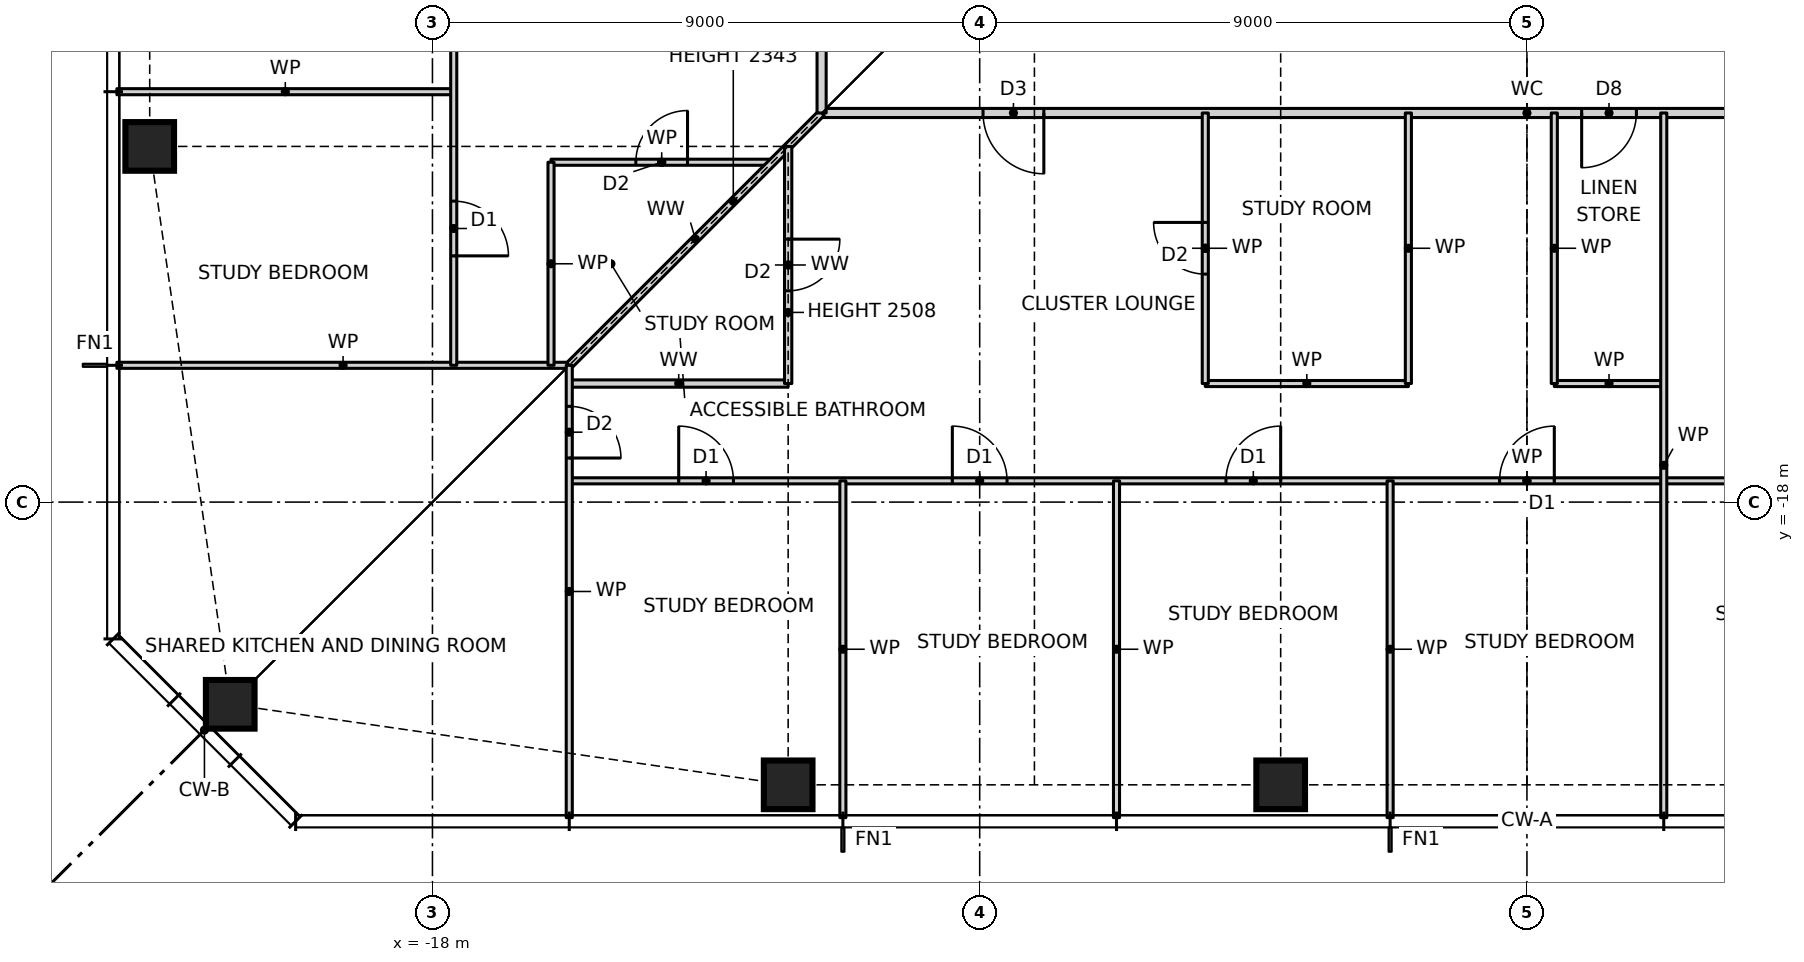
"""IFC4 building model, lengths in metres.
Left out: names, types, materials, properties, quantities, classifications, styles, units other than length and angle.
Written with IfcOpenShell. Run it as: python <this file> out.ifc"""

import sys

from ifc_helpers import new_model, si_unit, direction, frame, frame_2d, origin, origin_2d, place, context, subcontext, project, spatial, rectangle, hollow_rectangle, extrude, element, fill, save


model = new_model("IFC4")
c1 = context("Model", 3, precision=1e-05, world=origin(), true_north=direction((0.0, 1.0)))
c2 = subcontext(c1, "Body", "Model", "MODEL_VIEW")
j1 = project(units=[si_unit("LENGTHUNIT", "METRE"), si_unit("PLANEANGLEUNIT", "RADIAN")], contexts=[c1])
p1 = place(None, origin())
s1 = spatial("IfcSite", under=j1, at=p1, CompositionType="ELEMENT")
p2 = place(p1, origin())
s2 = spatial("IfcBuilding", under=s1, at=p2, CompositionType="ELEMENT")
p3 = place(p2, frame((0.0, 0.0, 60.5)))
s3 = spatial("IfcBuildingStorey", under=s2, at=p3, CompositionType="ELEMENT", Elevation=60.5)
for number, where, z_axis, x_axis in (
    (1, (-21.326, -21.326, 0.0), (0.0, 0.0, 1.0), (1.0, 0.0, 0.0)),
    (2, (-12.15, -22.65, 0.0), (0.0, 0.0, 1.0), (1.0, 0.0, 0.0)),
    (3, (-4.05, -22.65, 0.0), (0.0, 0.0, 1.0), (1.0, 0.0, 0.0)),
    (4, (-22.65, -12.15, 0.0), (0.0, 0.0, 1.0), (1.0, 0.0, 0.0)),
):
    element("IfcColumn", number, at=place(p3, frame(where, z_axis=z_axis, x_axis=x_axis)), inside=s3, PredefinedType="COLUMN", context=c2, shape_type="SweptSolid", body=[
        extrude(hollow_rectangle(XDim=0.8, YDim=0.8, WallThickness=0.09, at=origin_2d()), origin(), (0.0, 0.0, 1.0), 3.5),
    ])
p4 = place(p3, frame((-15.75, -17.65, 0.0), z_axis=(0.0, 0.0, 1.0), x_axis=(1.0, 0.0, 0.0)))
e5 = element("IfcWall", 5, at=p4, inside=s3, PredefinedType="PARTITIONING", context=c2, shape_type="SweptSolid", body=[
    extrude(rectangle(XDim=31.5, YDim=0.1, at=frame_2d((15.75, 0.0))), origin(), (0.0, 0.0, 1.0), 3.27),
])
p5 = place(p4, frame((1.8, 0.0, 0.0)))
e6 = element("IfcOpeningElement", 6, at=p5, cuts=e5, PredefinedType="OPENING", context=c2, shape_type="SweptSolid", body=[
    extrude(rectangle(XDim=0.9, YDim=2.1, at=frame_2d((0.45, 1.05))), frame((0.0, 0.06, 0.0), z_axis=(0.0, -1.0, 0.0), x_axis=(1.0, 0.0, 0.0)), (0.0, 0.0, 1.0), 0.12),
])
p6 = place(p4, frame((6.3, 0.0, 0.0)))
e7 = element("IfcOpeningElement", 7, at=p6, cuts=e5, PredefinedType="OPENING", context=c2, shape_type="SweptSolid", body=[
    extrude(rectangle(XDim=0.9, YDim=2.1, at=frame_2d((0.45, 1.05))), frame((0.0, 0.06, 0.0), z_axis=(0.0, -1.0, 0.0), x_axis=(1.0, 0.0, 0.0)), (0.0, 0.0, 1.0), 0.12),
])
p7 = place(p4, frame((10.8, 0.0, 0.0)))
e8 = element("IfcOpeningElement", 8, at=p7, cuts=e5, PredefinedType="OPENING", context=c2, shape_type="SweptSolid", body=[
    extrude(rectangle(XDim=0.9, YDim=2.1, at=frame_2d((0.45, 1.05))), frame((0.0, 0.06, 0.0), z_axis=(0.0, -1.0, 0.0), x_axis=(1.0, 0.0, 0.0)), (0.0, 0.0, 1.0), 0.12),
])
p8 = place(p4, frame((15.3, 0.0, 0.0)))
e9 = element("IfcOpeningElement", 9, at=p8, cuts=e5, PredefinedType="OPENING", context=c2, shape_type="SweptSolid", body=[
    extrude(rectangle(XDim=0.9, YDim=2.1, at=frame_2d((0.45, 1.05))), frame((0.0, 0.06, 0.0), z_axis=(0.0, -1.0, 0.0), x_axis=(1.0, 0.0, 0.0)), (0.0, 0.0, 1.0), 0.12),
])
p9 = place(p4, frame((19.8, 0.0, 0.0)))
e10 = element("IfcOpeningElement", 10, at=p9, cuts=e5, PredefinedType="OPENING", context=c2, shape_type="SweptSolid", body=[
    extrude(rectangle(XDim=0.9, YDim=2.1, at=frame_2d((0.45, 1.05))), frame((0.0, 0.06, 0.0), z_axis=(0.0, -1.0, 0.0), x_axis=(1.0, 0.0, 0.0)), (0.0, 0.0, 1.0), 0.12),
])
p10 = place(p4, frame((24.3, 0.0, 0.0)))
e11 = element("IfcOpeningElement", 11, at=p10, cuts=e5, PredefinedType="OPENING", context=c2, shape_type="SweptSolid", body=[
    extrude(rectangle(XDim=0.9, YDim=2.1, at=frame_2d((0.45, 1.05))), frame((0.0, 0.06, 0.0), z_axis=(0.0, -1.0, 0.0), x_axis=(1.0, 0.0, 0.0)), (0.0, 0.0, 1.0), 0.12),
])
p11 = place(p4, frame((28.8, 0.0, 0.0)))
e12 = element("IfcOpeningElement", 12, at=p11, cuts=e5, PredefinedType="OPENING", context=c2, shape_type="SweptSolid", body=[
    extrude(rectangle(XDim=0.9, YDim=2.1, at=frame_2d((0.45, 1.05))), frame((0.0, 0.06, 0.0), z_axis=(0.0, -1.0, 0.0), x_axis=(1.0, 0.0, 0.0)), (0.0, 0.0, 1.0), 0.12),
])
p12 = place(p3, frame((-15.75, -16.05, 0.0), z_axis=(0.0, 0.0, 1.0), x_axis=(1.0, 0.0, 0.0)))
e13 = element("IfcWall", 13, at=p12, inside=s3, PredefinedType="PARTITIONING", context=c2, shape_type="SweptSolid", body=[
    extrude(rectangle(XDim=3.6, YDim=0.12, at=frame_2d((1.8, 0.0))), origin(), (0.0, 0.0, 1.0), 3.27),
])
p13 = place(p3, frame((-5.29, -16.05, 0.0), z_axis=(0.0, 0.0, 1.0), x_axis=(1.0, 0.0, 0.0)))
e14 = element("IfcWall", 14, at=p13, inside=s3, PredefinedType="PARTITIONING", context=c2, shape_type="SweptSolid", body=[
    extrude(rectangle(XDim=3.34, YDim=0.1, at=frame_2d((1.67, 0.0))), origin(), (0.0, 0.0, 1.0), 3.27),
])
p14 = place(p3, frame((0.45, -16.05, 0.0), z_axis=(0.0, 0.0, 1.0), x_axis=(1.0, 0.0, 0.0)))
e15 = element("IfcWall", 15, at=p14, inside=s3, PredefinedType="PARTITIONING", context=c2, shape_type="SweptSolid", body=[
    extrude(rectangle(XDim=1.8, YDim=0.1, at=frame_2d((0.9, 0.0))), origin(), (0.0, 0.0, 1.0), 3.27),
])
p15 = place(p3, frame((-23.19, -15.75, 0.0), z_axis=(0.0, 0.0, 1.0), x_axis=(1.0, 0.0, 0.0)))
e16 = element("IfcWall", 16, at=p15, inside=s3, PredefinedType="PARTITIONING", context=c2, shape_type="SweptSolid", body=[
    extrude(rectangle(XDim=7.44, YDim=0.1, at=frame_2d((3.72, 0.0))), origin(), (0.0, 0.0, 1.0), 3.27),
])
p16 = place(p3, frame((-16.05, -12.41, 0.0), z_axis=(0.0, 0.0, 1.0), x_axis=(1.0, 0.0, 0.0)))
e17 = element("IfcWall", 17, at=p16, inside=s3, PredefinedType="PARTITIONING", context=c2, shape_type="SweptSolid", body=[
    extrude(rectangle(XDim=3.64, YDim=0.1, at=frame_2d((1.82, 0.0))), origin(), (0.0, 0.0, 1.0), 3.27),
])
p17 = place(p16, frame((1.395, 0.0, 0.0)))
e18 = element("IfcOpeningElement", 18, at=p17, cuts=e17, PredefinedType="OPENING", context=c2, shape_type="SweptSolid", body=[
    extrude(rectangle(XDim=0.85, YDim=2.1, at=frame_2d((0.425, 1.05))), frame((0.0, 0.06, 0.0), z_axis=(0.0, -1.0, 0.0), x_axis=(1.0, 0.0, 0.0)), (0.0, 0.0, 1.0), 0.12),
])
p18 = place(p3, frame((-11.6, -11.6, 0.0), z_axis=(0.0, 0.0, 1.0), x_axis=(1.0, 0.0, 0.0)))
e19 = element("IfcWall", 19, at=p18, inside=s3, PredefinedType="PARTITIONING", context=c2, shape_type="SweptSolid", body=[
    extrude(rectangle(XDim=23.2, YDim=0.15, at=frame_2d((11.6, 0.0))), origin(), (0.0, 0.0, 1.0), 3.27),
])
p19 = place(p18, frame((2.655, 0.0, 0.0)))
e20 = element("IfcOpeningElement", 20, at=p19, cuts=e19, PredefinedType="OPENING", context=c2, shape_type="SweptSolid", body=[
    extrude(rectangle(XDim=1.0, YDim=2.1, at=frame_2d((0.5, 1.05))), frame((0.0, 0.085, 0.0), z_axis=(0.0, -1.0, 0.0), x_axis=(1.0, 0.0, 0.0)), (0.0, 0.0, 1.0), 0.17),
])
p20 = place(p18, frame((12.5, 0.0, 0.0)))
e21 = element("IfcOpeningElement", 21, at=p20, cuts=e19, PredefinedType="OPENING", context=c2, shape_type="SweptSolid", body=[
    extrude(rectangle(XDim=0.9, YDim=2.1, at=frame_2d((0.45, 1.05))), frame((0.0, 0.085, 0.0), z_axis=(0.0, -1.0, 0.0), x_axis=(1.0, 0.0, 0.0)), (0.0, 0.0, 1.0), 0.17),
])
p21 = place(p18, frame((21.025, 0.0, 0.0)))
e22 = element("IfcOpeningElement", 22, at=p21, cuts=e19, PredefinedType="OPENING", context=c2, shape_type="SweptSolid", body=[
    extrude(rectangle(XDim=1.0, YDim=2.1, at=frame_2d((0.5, 1.05))), frame((0.0, 0.085, 0.0), z_axis=(0.0, -1.0, 0.0), x_axis=(1.0, 0.0, 0.0)), (0.0, 0.0, 1.0), 0.17),
])
p22 = place(p3, frame((-23.19, -11.25, 0.0), z_axis=(0.0, 0.0, 1.0), x_axis=(1.0, 0.0, 0.0)))
e23 = element("IfcWall", 23, at=p22, inside=s3, PredefinedType="PARTITIONING", context=c2, shape_type="SweptSolid", body=[
    extrude(rectangle(XDim=5.54, YDim=0.1, at=frame_2d((2.77, 0.0))), origin(), (0.0, 0.0, 1.0), 3.27),
])
p23 = place(p3, frame((-15.75, -15.75, 0.0), z_axis=(0.0, 0.0, 1.0), x_axis=(0.707106781187, 0.707106781187, 0.0)))
e24 = element("IfcWall", 24, at=p23, inside=s3, PredefinedType="PARTITIONING", context=c2, shape_type="SweptSolid", body=[
    extrude(rectangle(XDim=5.869, YDim=0.12, at=frame_2d((2.935, 0.0))), origin(), (0.0, 0.0, 1.0), 2.343),
])
p24 = place(p3, frame((2.25, -23.19, 0.0), z_axis=(0.0, 0.0, 1.0), x_axis=(0.0, 1.0, 0.0)))
e25 = element("IfcWall", 25, at=p24, inside=s3, PredefinedType="PARTITIONING", context=c2, shape_type="SweptSolid", body=[
    extrude(rectangle(XDim=11.59, YDim=0.1, at=frame_2d((5.795, 0.0))), origin(), (0.0, 0.0, 1.0), 3.27),
])
for number, where, z_axis, x_axis in (
    (26, (0.45, -16.05, 0.0), (0.0, 0.0, 1.0), (0.0, 1.0, 0.0)),
    (27, (-1.95, -16.05, 0.0), (0.0, 0.0, 1.0), (0.0, 1.0, 0.0)),
):
    element("IfcWall", number, at=place(p3, frame(where, z_axis=z_axis, x_axis=x_axis)), inside=s3, PredefinedType="PARTITIONING", context=c2, shape_type="SweptSolid", body=[
        extrude(rectangle(XDim=4.45, YDim=0.1, at=frame_2d((2.225, 0.0))), origin(), (0.0, 0.0, 1.0), 3.27),
    ])
p25 = place(p3, frame((-2.25, -23.19, 0.0), z_axis=(0.0, 0.0, 1.0), x_axis=(0.0, 1.0, 0.0)))
e28 = element("IfcWall", 28, at=p25, inside=s3, PredefinedType="PARTITIONING", context=c2, shape_type="SweptSolid", body=[
    extrude(rectangle(XDim=5.54, YDim=0.1, at=frame_2d((2.77, 0.0))), origin(), (0.0, 0.0, 1.0), 3.27),
])
p26 = place(p3, frame((-5.29, -16.05, 0.0), z_axis=(0.0, 0.0, 1.0), x_axis=(0.0, 1.0, 0.0)))
e29 = element("IfcWall", 29, at=p26, inside=s3, PredefinedType="PARTITIONING", context=c2, shape_type="SweptSolid", body=[
    extrude(rectangle(XDim=4.45, YDim=0.1, at=frame_2d((2.225, 0.0))), origin(), (0.0, 0.0, 1.0), 3.27),
])
p27 = place(p26, frame((1.8, 0.0, 0.0)))
e30 = element("IfcOpeningElement", 30, at=p27, cuts=e29, PredefinedType="OPENING", context=c2, shape_type="SweptSolid", body=[
    extrude(rectangle(XDim=0.85, YDim=2.1, at=frame_2d((0.425, 1.05))), frame((0.0, 0.06, 0.0), z_axis=(0.0, -1.0, 0.0), x_axis=(1.0, 0.0, 0.0)), (0.0, 0.0, 1.0), 0.12),
])
for number, where, z_axis, x_axis in (
    (31, (-6.75, -23.19, 0.0), (0.0, 0.0, 1.0), (0.0, 1.0, 0.0)),
    (32, (-11.25, -23.19, 0.0), (0.0, 0.0, 1.0), (0.0, 1.0, 0.0)),
):
    element("IfcWall", number, at=place(p3, frame(where, z_axis=z_axis, x_axis=x_axis)), inside=s3, PredefinedType="PARTITIONING", context=c2, shape_type="SweptSolid", body=[
        extrude(rectangle(XDim=5.54, YDim=0.1, at=frame_2d((2.77, 0.0))), origin(), (0.0, 0.0, 1.0), 3.27),
    ])
p28 = place(p3, frame((-11.6, -11.6, 0.0), z_axis=(0.0, 0.0, 1.0), x_axis=(0.0, 1.0, 0.0)))
e33 = element("IfcWall", 33, at=p28, inside=s3, PredefinedType="PARTITIONING", context=c2, shape_type="SweptSolid", body=[
    extrude(rectangle(XDim=24.2, YDim=0.15, at=frame_2d((12.1, 0.0))), origin(), (0.0, 0.0, 1.0), 3.27),
])
p29 = place(p28, frame((19.225, 0.0, 0.0)))
e34 = element("IfcOpeningElement", 34, at=p29, cuts=e33, PredefinedType="OPENING", context=c2, shape_type="SweptSolid", body=[
    extrude(rectangle(XDim=1.0, YDim=2.1, at=frame_2d((0.5, 1.05))), frame((0.0, 0.085, 0.0), z_axis=(0.0, -1.0, 0.0), x_axis=(1.0, 0.0, 0.0)), (0.0, 0.0, 1.0), 0.17),
])
p30 = place(p28, frame((3.425, 0.0, 0.0)))
e35 = element("IfcOpeningElement", 35, at=p30, cuts=e33, PredefinedType="OPENING", context=c2, shape_type="SweptSolid", body=[
    extrude(rectangle(XDim=1.0, YDim=2.1, at=frame_2d((0.5, 1.05))), frame((0.0, 0.085, 0.0), z_axis=(0.0, -1.0, 0.0), x_axis=(1.0, 0.0, 0.0)), (0.0, 0.0, 1.0), 0.17),
])
p31 = place(p3, frame((-12.15, -16.05, 0.0), z_axis=(0.0, 0.0, 1.0), x_axis=(0.0, 1.0, 0.0)))
e36 = element("IfcWall", 36, at=p31, inside=s3, PredefinedType="PARTITIONING", context=c2, shape_type="SweptSolid", body=[
    extrude(rectangle(XDim=3.9, YDim=0.12, at=frame_2d((1.95, 0.0))), origin(), (0.0, 0.0, 1.0), 2.508),
])
p32 = place(p31, frame((1.525, 0.0, 0.0)))
e37 = element("IfcOpeningElement", 37, at=p32, cuts=e36, PredefinedType="OPENING", context=c2, shape_type="SweptSolid", body=[
    extrude(rectangle(XDim=0.85, YDim=2.1, at=frame_2d((0.425, 1.05))), frame((0.0, 0.07, 0.0), z_axis=(0.0, -1.0, 0.0), x_axis=(1.0, 0.0, 0.0)), (0.0, 0.0, 1.0), 0.14),
])
p33 = place(p3, frame((-15.75, -23.19, 0.0), z_axis=(0.0, 0.0, 1.0), x_axis=(0.0, 1.0, 0.0)))
e38 = element("IfcWall", 38, at=p33, inside=s3, PredefinedType="PARTITIONING", context=c2, shape_type="SweptSolid", body=[
    extrude(rectangle(XDim=7.44, YDim=0.1, at=frame_2d((3.72, 0.0))), origin(), (0.0, 0.0, 1.0), 3.27),
])
p34 = place(p33, frame((5.915, 0.0, 0.0)))
e39 = element("IfcOpeningElement", 39, at=p34, cuts=e38, PredefinedType="OPENING", context=c2, shape_type="SweptSolid", body=[
    extrude(rectangle(XDim=0.85, YDim=2.1, at=frame_2d((0.425, 1.05))), frame((0.0, 0.06, 0.0), z_axis=(0.0, -1.0, 0.0), x_axis=(1.0, 0.0, 0.0)), (0.0, 0.0, 1.0), 0.12),
])
p35 = place(p3, frame((-16.05, -15.75, 0.0), z_axis=(0.0, 0.0, 1.0), x_axis=(0.0, 1.0, 0.0)))
e40 = element("IfcWall", 40, at=p35, inside=s3, PredefinedType="PARTITIONING", context=c2, shape_type="SweptSolid", body=[
    extrude(rectangle(XDim=3.34, YDim=0.1, at=frame_2d((1.67, 0.0))), origin(), (0.0, 0.0, 1.0), 3.27),
])
p36 = place(p3, frame((-17.65, -15.75, 0.0), z_axis=(0.0, 0.0, 1.0), x_axis=(0.0, 1.0, 0.0)))
e41 = element("IfcWall", 41, at=p36, inside=s3, PredefinedType="PARTITIONING", context=c2, shape_type="SweptSolid", body=[
    extrude(rectangle(XDim=31.5, YDim=0.1, at=frame_2d((15.75, 0.0))), origin(), (0.0, 0.0, 1.0), 3.27),
])
p37 = place(p36, frame((28.8, 0.0, 0.0)))
e42 = element("IfcOpeningElement", 42, at=p37, cuts=e41, PredefinedType="OPENING", context=c2, shape_type="SweptSolid", body=[
    extrude(rectangle(XDim=0.9, YDim=2.1, at=frame_2d((0.45, 1.05))), frame((0.0, 0.06, 0.0), z_axis=(0.0, -1.0, 0.0), x_axis=(1.0, 0.0, 0.0)), (0.0, 0.0, 1.0), 0.12),
])
p38 = place(p36, frame((24.3, 0.0, 0.0)))
e43 = element("IfcOpeningElement", 43, at=p38, cuts=e41, PredefinedType="OPENING", context=c2, shape_type="SweptSolid", body=[
    extrude(rectangle(XDim=0.9, YDim=2.1, at=frame_2d((0.45, 1.05))), frame((0.0, 0.06, 0.0), z_axis=(0.0, -1.0, 0.0), x_axis=(1.0, 0.0, 0.0)), (0.0, 0.0, 1.0), 0.12),
])
p39 = place(p36, frame((19.8, 0.0, 0.0)))
e44 = element("IfcOpeningElement", 44, at=p39, cuts=e41, PredefinedType="OPENING", context=c2, shape_type="SweptSolid", body=[
    extrude(rectangle(XDim=0.9, YDim=2.1, at=frame_2d((0.45, 1.05))), frame((0.0, 0.06, 0.0), z_axis=(0.0, -1.0, 0.0), x_axis=(1.0, 0.0, 0.0)), (0.0, 0.0, 1.0), 0.12),
])
p40 = place(p36, frame((15.3, 0.0, 0.0)))
e45 = element("IfcOpeningElement", 45, at=p40, cuts=e41, PredefinedType="OPENING", context=c2, shape_type="SweptSolid", body=[
    extrude(rectangle(XDim=0.9, YDim=2.1, at=frame_2d((0.45, 1.05))), frame((0.0, 0.06, 0.0), z_axis=(0.0, -1.0, 0.0), x_axis=(1.0, 0.0, 0.0)), (0.0, 0.0, 1.0), 0.12),
])
p41 = place(p36, frame((10.8, 0.0, 0.0)))
e46 = element("IfcOpeningElement", 46, at=p41, cuts=e41, PredefinedType="OPENING", context=c2, shape_type="SweptSolid", body=[
    extrude(rectangle(XDim=0.9, YDim=2.1, at=frame_2d((0.45, 1.05))), frame((0.0, 0.06, 0.0), z_axis=(0.0, -1.0, 0.0), x_axis=(1.0, 0.0, 0.0)), (0.0, 0.0, 1.0), 0.12),
])
p42 = place(p36, frame((6.3, 0.0, 0.0)))
e47 = element("IfcOpeningElement", 47, at=p42, cuts=e41, PredefinedType="OPENING", context=c2, shape_type="SweptSolid", body=[
    extrude(rectangle(XDim=0.9, YDim=2.1, at=frame_2d((0.45, 1.05))), frame((0.0, 0.06, 0.0), z_axis=(0.0, -1.0, 0.0), x_axis=(1.0, 0.0, 0.0)), (0.0, 0.0, 1.0), 0.12),
])
p43 = place(p36, frame((1.8, 0.0, 0.0)))
e48 = element("IfcOpeningElement", 48, at=p43, cuts=e41, PredefinedType="OPENING", context=c2, shape_type="SweptSolid", body=[
    extrude(rectangle(XDim=0.9, YDim=2.1, at=frame_2d((0.45, 1.05))), frame((0.0, 0.06, 0.0), z_axis=(0.0, -1.0, 0.0), x_axis=(1.0, 0.0, 0.0)), (0.0, 0.0, 1.0), 0.12),
])
p44 = place(p5, origin())
e49 = element("IfcDoor", 49, at=p44, inside=s3, OperationType="SINGLE_SWING_LEFT", PredefinedType="DOOR", context=c2, shape_type="SweptSolid", body=[
    extrude(rectangle(XDim=0.9, YDim=2.1, at=frame_2d((0.45, 1.05))), frame((0.0, 0.025, 0.0), z_axis=(0.0, -1.0, 0.0), x_axis=(1.0, 0.0, 0.0)), (0.0, 0.0, 1.0), 0.05),
])
fill(e6, e49)
p45 = place(p6, origin())
e50 = element("IfcDoor", 50, at=p45, inside=s3, OperationType="SINGLE_SWING_LEFT", PredefinedType="DOOR", context=c2, shape_type="SweptSolid", body=[
    extrude(rectangle(XDim=0.9, YDim=2.1, at=frame_2d((0.45, 1.05))), frame((0.0, 0.025, 0.0), z_axis=(0.0, -1.0, 0.0), x_axis=(1.0, 0.0, 0.0)), (0.0, 0.0, 1.0), 0.05),
])
fill(e7, e50)
p46 = place(p7, origin())
e51 = element("IfcDoor", 51, at=p46, inside=s3, OperationType="SINGLE_SWING_RIGHT", PredefinedType="DOOR", context=c2, shape_type="SweptSolid", body=[
    extrude(rectangle(XDim=0.9, YDim=2.1, at=frame_2d((0.45, 1.05))), frame((0.0, 0.025, 0.0), z_axis=(0.0, -1.0, 0.0), x_axis=(1.0, 0.0, 0.0)), (0.0, 0.0, 1.0), 0.05),
])
fill(e8, e51)
p47 = place(p8, origin())
e52 = element("IfcDoor", 52, at=p47, inside=s3, OperationType="SINGLE_SWING_RIGHT", PredefinedType="DOOR", context=c2, shape_type="SweptSolid", body=[
    extrude(rectangle(XDim=0.9, YDim=2.1, at=frame_2d((0.45, 1.05))), frame((0.0, 0.025, 0.0), z_axis=(0.0, -1.0, 0.0), x_axis=(1.0, 0.0, 0.0)), (0.0, 0.0, 1.0), 0.05),
])
fill(e9, e52)
p48 = place(p19, frame((1.0, 0.0, 0.0), z_axis=(0.0, 0.0, 1.0), x_axis=(-1.0, 0.0, 0.0)))
e53 = element("IfcDoor", 53, at=p48, inside=s3, OperationType="SINGLE_SWING_LEFT", PredefinedType="DOOR", context=c2, shape_type="SweptSolid", body=[
    extrude(rectangle(XDim=1.0, YDim=2.1, at=frame_2d((0.5, 1.05))), frame((0.0, 0.025, 0.0), z_axis=(0.0, -1.0, 0.0), x_axis=(1.0, 0.0, 0.0)), (0.0, 0.0, 1.0), 0.05),
])
fill(e20, e53)
p49 = place(p32, frame((0.85, 0.0, 0.0), z_axis=(0.0, 0.0, 1.0), x_axis=(-1.0, 0.0, 0.0)))
e54 = element("IfcDoor", 54, at=p49, inside=s3, OperationType="SINGLE_SWING_LEFT", PredefinedType="DOOR", context=c2, shape_type="SweptSolid", body=[
    extrude(rectangle(XDim=0.85, YDim=2.1, at=frame_2d((0.425, 1.05))), frame((0.0, 0.025, 0.0), z_axis=(0.0, -1.0, 0.0), x_axis=(1.0, 0.0, 0.0)), (0.0, 0.0, 1.0), 0.05),
])
fill(e37, e54)
p50 = place(p27, origin())
e55 = element("IfcDoor", 55, at=p50, inside=s3, OperationType="SINGLE_SWING_RIGHT", PredefinedType="DOOR", context=c2, shape_type="SweptSolid", body=[
    extrude(rectangle(XDim=0.85, YDim=2.1, at=frame_2d((0.425, 1.05))), frame((0.0, 0.025, 0.0), z_axis=(0.0, -1.0, 0.0), x_axis=(1.0, 0.0, 0.0)), (0.0, 0.0, 1.0), 0.05),
])
fill(e30, e55)
p51 = place(p20, frame((0.9, 0.0, 0.0), z_axis=(0.0, 0.0, 1.0), x_axis=(-1.0, 0.0, 0.0)))
e56 = element("IfcDoor", 56, at=p51, inside=s3, OperationType="SINGLE_SWING_RIGHT", PredefinedType="DOOR", context=c2, shape_type="SweptSolid", body=[
    extrude(rectangle(XDim=0.9, YDim=2.1, at=frame_2d((0.45, 1.05))), frame((0.0, 0.025, 0.0), z_axis=(0.0, -1.0, 0.0), x_axis=(1.0, 0.0, 0.0)), (0.0, 0.0, 1.0), 0.05),
])
fill(e21, e56)
p52 = place(p43, frame((0.9, 0.0, 0.0), z_axis=(0.0, 0.0, 1.0), x_axis=(-1.0, 0.0, 0.0)))
e57 = element("IfcDoor", 57, at=p52, inside=s3, OperationType="SINGLE_SWING_RIGHT", PredefinedType="DOOR", context=c2, shape_type="SweptSolid", body=[
    extrude(rectangle(XDim=0.9, YDim=2.1, at=frame_2d((0.45, 1.05))), frame((0.0, 0.025, 0.0), z_axis=(0.0, -1.0, 0.0), x_axis=(1.0, 0.0, 0.0)), (0.0, 0.0, 1.0), 0.05),
])
fill(e48, e57)
p53 = place(p17, origin())
e58 = element("IfcDoor", 58, at=p53, inside=s3, OperationType="SINGLE_SWING_RIGHT", PredefinedType="DOOR", context=c2, shape_type="SweptSolid", body=[
    extrude(rectangle(XDim=0.85, YDim=2.1, at=frame_2d((0.425, 1.05))), frame((0.0, 0.025, 0.0), z_axis=(0.0, -1.0, 0.0), x_axis=(1.0, 0.0, 0.0)), (0.0, 0.0, 1.0), 0.05),
])
fill(e18, e58)
p54 = place(p34, frame((0.85, 0.0, 0.0), z_axis=(0.0, 0.0, 1.0), x_axis=(-1.0, 0.0, 0.0)))
e59 = element("IfcDoor", 59, at=p54, inside=s3, OperationType="SINGLE_SWING_RIGHT", PredefinedType="DOOR", context=c2, shape_type="SweptSolid", body=[
    extrude(rectangle(XDim=0.85, YDim=2.1, at=frame_2d((0.425, 1.05))), frame((0.0, 0.025, 0.0), z_axis=(0.0, -1.0, 0.0), x_axis=(1.0, 0.0, 0.0)), (0.0, 0.0, 1.0), 0.05),
])
fill(e39, e59)
save(model, sys.argv[1])
